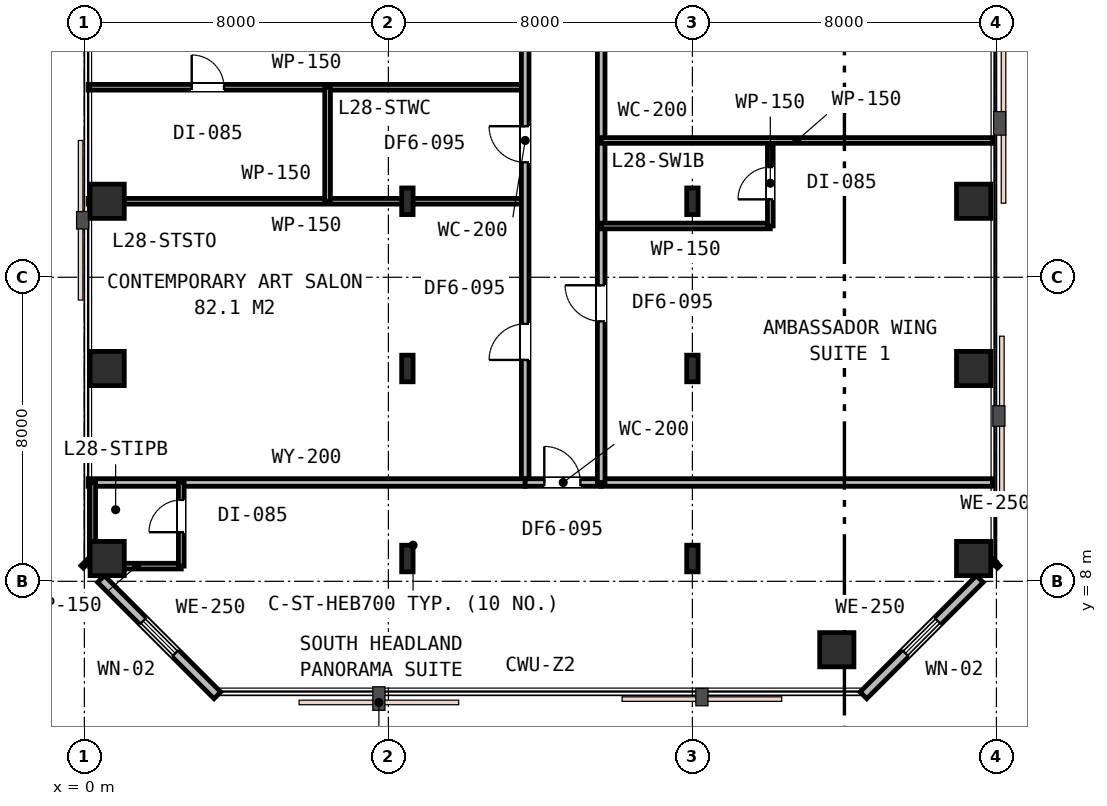
"""IFC4 building model, lengths in metres.
Left out: names, types, materials, properties, quantities, classifications, styles, units other than length and angle.
Written with IfcOpenShell. Run it as: python <this file> out.ifc"""

import sys

from ifc_helpers import new_model, si_unit, direction, frame, frame_2d, origin, origin_2d, place, context, subcontext, project, spatial, rectangle, i_section, extrude, element, fill, save


model = new_model("IFC4")
c1 = context("Model", 3, precision=1e-05, world=origin(), true_north=direction((0.0, 1.0)))
c2 = subcontext(c1, "Body", "Model", "MODEL_VIEW")
j1 = project(units=[si_unit("LENGTHUNIT", "METRE"), si_unit("PLANEANGLEUNIT", "RADIAN")], contexts=[c1])
p1 = place(None, origin())
s1 = spatial("IfcSite", under=j1, at=p1, CompositionType="ELEMENT")
p2 = place(p1, origin())
s2 = spatial("IfcBuilding", under=s1, at=p2, CompositionType="ELEMENT")
p3 = place(p2, frame((0.0, 0.0, 111.6)))
s3 = spatial("IfcBuildingStorey", under=s2, at=p3, CompositionType="ELEMENT", Elevation=111.6)
for number, where, z_axis, x_axis in (
    (1, (0.6, 8.6, 0.0), (0.0, 0.0, 1.0), (1.0, 0.0, 0.0)),
    (2, (0.6, 13.6, 0.0), (0.0, 0.0, 1.0), (1.0, 0.0, 0.0)),
    (3, (0.6, 18.0, 0.0), (0.0, 0.0, 1.0), (1.0, 0.0, 0.0)),
    (4, (19.8, 6.2, 0.0), (0.0, 0.0, 1.0), (1.0, 0.0, 0.0)),
    (5, (23.4, 8.6, 0.0), (0.0, 0.0, 1.0), (1.0, 0.0, 0.0)),
    (6, (23.4, 13.6, 0.0), (0.0, 0.0, 1.0), (1.0, 0.0, 0.0)),
    (7, (23.4, 18.0, 0.0), (0.0, 0.0, 1.0), (1.0, 0.0, 0.0)),
):
    element("IfcColumn", number, at=place(p3, frame(where, z_axis=z_axis, x_axis=x_axis)), inside=s3, PredefinedType="COLUMN", context=c2, shape_type="SweptSolid", body=[
        extrude(rectangle(XDim=0.9, YDim=0.9, at=origin_2d()), origin(), (0.0, 0.0, 1.0), 3.6),
    ])
for number, where, z_axis, x_axis in (
    (8, (8.5, 8.6, 0.0), (0.0, 0.0, 1.0), (1.0, 0.0, 0.0)),
    (9, (16.0, 8.6, 0.0), (0.0, 0.0, 1.0), (1.0, 0.0, 0.0)),
    (10, (8.5, 13.6, 0.0), (0.0, 0.0, 1.0), (1.0, 0.0, 0.0)),
    (11, (16.0, 13.6, 0.0), (0.0, 0.0, 1.0), (1.0, 0.0, 0.0)),
    (12, (8.5, 18.0, 0.0), (0.0, 0.0, 1.0), (1.0, 0.0, 0.0)),
    (13, (16.0, 18.0, 0.0), (0.0, 0.0, 1.0), (1.0, 0.0, 0.0)),
):
    element("IfcColumn", number, at=place(p3, frame(where, z_axis=z_axis, x_axis=x_axis)), inside=s3, PredefinedType="COLUMN", context=c2, shape_type="SweptSolid", body=[
        extrude(i_section(OverallWidth=0.3, OverallDepth=0.7, WebThickness=0.017, FlangeThickness=0.032, FilletRadius=0.027, at=origin_2d()), origin(), (0.0, 0.0, 1.0), 3.6),
    ])
p4 = place(p3, frame((20.5, 5.0, 0.0), z_axis=(0.0, 0.0, 1.0), x_axis=(0.707106781187, 0.707106781187, 0.0)))
e14 = element("IfcWall", 14, at=p4, inside=s3, PredefinedType="STANDARD", context=c2, shape_type="SweptSolid", body=[
    extrude(rectangle(XDim=4.33, YDim=0.25, at=frame_2d((2.165, 0.0))), origin(), (0.0, 0.0, 1.0), 3.33),
])
p5 = place(p4, frame((1.565, 0.0, 0.85)))
e15 = element("IfcOpeningElement", 15, at=p5, cuts=e14, PredefinedType="OPENING", context=c2, shape_type="SweptSolid", body=[
    extrude(rectangle(XDim=1.2, YDim=1.6, at=frame_2d((0.6, 0.8))), frame((0.0, 0.135, 0.0), z_axis=(0.0, -1.0, 0.0), x_axis=(1.0, 0.0, 0.0)), (0.0, 0.0, 1.0), 0.27),
])
for number, where, z_axis, x_axis in (
    (16, (23.938, 8.438, 0.0), (0.0, 0.0, 1.0), (0.707, 0.707, 0.0)),
    (17, (0.0, 8.5, 0.0), (0.0, 0.0, 1.0), (0.707, -0.707, 0.0)),
):
    element("IfcWall", number, at=place(p3, frame(where, z_axis=z_axis, x_axis=x_axis)), inside=s3, PredefinedType="STANDARD", context=c2, shape_type="SweptSolid", body=[
        extrude(rectangle(XDim=0.087, YDim=0.25, at=frame_2d((0.044, 0.0))), origin(), (0.0, 0.0, 1.0), 3.33),
    ])
p6 = place(p3, frame((0.438, 8.062, 0.0), z_axis=(0.0, 0.0, 1.0), x_axis=(0.707106781187, -0.707106781187, 0.0)))
e18 = element("IfcWall", 18, at=p6, inside=s3, PredefinedType="STANDARD", context=c2, shape_type="SweptSolid", body=[
    extrude(rectangle(XDim=4.33, YDim=0.25, at=frame_2d((2.165, 0.0))), origin(), (0.0, 0.0, 1.0), 3.33),
])
p7 = place(p6, frame((1.565, 0.0, 0.85)))
e19 = element("IfcOpeningElement", 19, at=p7, cuts=e18, PredefinedType="OPENING", context=c2, shape_type="SweptSolid", body=[
    extrude(rectangle(XDim=1.2, YDim=1.6, at=frame_2d((0.6, 0.8))), frame((0.0, 0.135, 0.0), z_axis=(0.0, -1.0, 0.0), x_axis=(1.0, 0.0, 0.0)), (0.0, 0.0, 1.0), 0.27),
])
p8 = place(p3, frame((0.1, 18.0, 0.0), z_axis=(0.0, 0.0, 1.0), x_axis=(1.0, 0.0, 0.0)))
e20 = element("IfcWall", 20, at=p8, inside=s3, PredefinedType="PARTITIONING", context=c2, shape_type="SweptSolid", body=[
    extrude(rectangle(XDim=11.5, YDim=0.15, at=frame_2d((5.75, 0.0))), origin(), (0.0, 0.0, 1.0), 2.87),
])
p9 = place(p3, frame((0.1, 21.0, 0.0), z_axis=(0.0, 0.0, 1.0), x_axis=(1.0, 0.0, 0.0)))
e21 = element("IfcWall", 21, at=p9, inside=s3, PredefinedType="PARTITIONING", context=c2, shape_type="SweptSolid", body=[
    extrude(rectangle(XDim=11.5, YDim=0.15, at=frame_2d((5.75, 0.0))), origin(), (0.0, 0.0, 1.0), 2.87),
])
p10 = place(p9, frame((2.725, 0.0, 0.0)))
e22 = element("IfcOpeningElement", 22, at=p10, cuts=e21, PredefinedType="OPENING", context=c2, shape_type="SweptSolid", body=[
    extrude(rectangle(XDim=0.85, YDim=2.15, at=frame_2d((0.425, 1.075))), frame((0.0, 0.085, 0.0), z_axis=(0.0, -1.0, 0.0), x_axis=(1.0, 0.0, 0.0)), (0.0, 0.0, 1.0), 0.17),
])
p11 = place(p3, frame((6.4, 18.0, 0.0), z_axis=(0.0, 0.0, 1.0), x_axis=(0.0, 1.0, 0.0)))
e23 = element("IfcWall", 23, at=p11, inside=s3, PredefinedType="PARTITIONING", context=c2, shape_type="SweptSolid", body=[
    extrude(rectangle(XDim=3.0, YDim=0.15, at=frame_2d((1.5, 0.0))), origin(), (0.0, 0.0, 1.0), 2.87),
])
p12 = place(p3, frame((11.6, 10.6, 0.0), z_axis=(0.0, 0.0, 1.0), x_axis=(0.0, 1.0, 0.0)))
e24 = element("IfcWall", 24, at=p12, inside=s3, PredefinedType="PARTITIONING", context=c2, shape_type="SweptSolid", body=[
    extrude(rectangle(XDim=18.0, YDim=0.2, at=frame_2d((9.0, 0.0))), origin(), (0.0, 0.0, 1.0), 2.87),
])
p13 = place(p12, frame((8.425, 0.0, 0.0)))
e25 = element("IfcOpeningElement", 25, at=p13, cuts=e24, PredefinedType="OPENING", context=c2, shape_type="SweptSolid", body=[
    extrude(rectangle(XDim=0.95, YDim=2.15, at=frame_2d((0.475, 1.075))), frame((0.0, 0.11, 0.0), z_axis=(0.0, -1.0, 0.0), x_axis=(1.0, 0.0, 0.0)), (0.0, 0.0, 1.0), 0.22),
])
p14 = place(p12, frame((13.725, 0.0, 0.0)))
e26 = element("IfcOpeningElement", 26, at=p14, cuts=e24, PredefinedType="OPENING", context=c2, shape_type="SweptSolid", body=[
    extrude(rectangle(XDim=0.95, YDim=2.15, at=frame_2d((0.475, 1.075))), frame((0.0, 0.11, 0.0), z_axis=(0.0, -1.0, 0.0), x_axis=(1.0, 0.0, 0.0)), (0.0, 0.0, 1.0), 0.22),
])
p15 = place(p12, frame((3.225, 0.0, 0.0)))
e27 = element("IfcOpeningElement", 27, at=p15, cuts=e24, PredefinedType="OPENING", context=c2, shape_type="SweptSolid", body=[
    extrude(rectangle(XDim=0.95, YDim=2.15, at=frame_2d((0.475, 1.075))), frame((0.0, 0.11, 0.0), z_axis=(0.0, -1.0, 0.0), x_axis=(1.0, 0.0, 0.0)), (0.0, 0.0, 1.0), 0.22),
])
p16 = place(p3, frame((0.1, 10.6, 0.0), z_axis=(0.0, 0.0, 1.0), x_axis=(1.0, 0.0, 0.0)))
e28 = element("IfcWall", 28, at=p16, inside=s3, PredefinedType="PARTITIONING", context=c2, shape_type="SweptSolid", body=[
    extrude(rectangle(XDim=11.5, YDim=0.2, at=frame_2d((5.75, 0.0))), origin(), (0.0, 0.0, 1.0), 2.87),
])
p17 = place(p3, frame((13.6, 10.6, 0.0), z_axis=(0.0, 0.0, 1.0), x_axis=(1.0, 0.0, 0.0)))
e29 = element("IfcWall", 29, at=p17, inside=s3, PredefinedType="PARTITIONING", context=c2, shape_type="SweptSolid", body=[
    extrude(rectangle(XDim=10.3, YDim=0.2, at=frame_2d((5.15, 0.0))), origin(), (0.0, 0.0, 1.0), 2.87),
])
p18 = place(p3, frame((11.6, 10.6, 0.0), z_axis=(0.0, 0.0, 1.0), x_axis=(1.0, 0.0, 0.0)))
e30 = element("IfcWall", 30, at=p18, inside=s3, PredefinedType="PARTITIONING", context=c2, shape_type="SweptSolid", body=[
    extrude(rectangle(XDim=2.0, YDim=0.2, at=frame_2d((1.0, 0.0))), origin(), (0.0, 0.0, 1.0), 3.01),
])
p19 = place(p18, frame((0.502, 0.0, 0.0)))
e31 = element("IfcOpeningElement", 31, at=p19, cuts=e30, PredefinedType="OPENING", context=c2, shape_type="SweptSolid", body=[
    extrude(rectangle(XDim=0.95, YDim=2.15, at=frame_2d((0.475, 1.075))), frame((0.0, 0.11, 0.0), z_axis=(0.0, -1.0, 0.0), x_axis=(1.0, 0.0, 0.0)), (0.0, 0.0, 1.0), 0.22),
])
p20 = place(p3, frame((0.2, 8.4, 0.0), z_axis=(0.0, 0.0, 1.0), x_axis=(1.0, 0.0, 0.0)))
e32 = element("IfcWall", 32, at=p20, inside=s3, PredefinedType="PARTITIONING", context=c2, shape_type="SweptSolid", body=[
    extrude(rectangle(XDim=2.35, YDim=0.15, at=frame_2d((1.175, 0.0))), origin(), (0.0, 0.0, 1.0), 2.87),
])
p21 = place(p3, frame((2.55, 8.4, 0.0), z_axis=(0.0, 0.0, 1.0), x_axis=(0.0, 1.0, 0.0)))
e33 = element("IfcWall", 33, at=p21, inside=s3, PredefinedType="PARTITIONING", context=c2, shape_type="SweptSolid", body=[
    extrude(rectangle(XDim=2.2, YDim=0.15, at=frame_2d((1.1, 0.0))), origin(), (0.0, 0.0, 1.0), 2.87),
])
p22 = place(p21, frame((0.892, 0.0, 0.0)))
e34 = element("IfcOpeningElement", 34, at=p22, cuts=e33, PredefinedType="OPENING", context=c2, shape_type="SweptSolid", body=[
    extrude(rectangle(XDim=0.85, YDim=2.15, at=frame_2d((0.425, 1.075))), frame((0.0, 0.085, 0.0), z_axis=(0.0, -1.0, 0.0), x_axis=(1.0, 0.0, 0.0)), (0.0, 0.0, 1.0), 0.17),
])
p23 = place(p3, frame((0.22, 8.38, 0.0), z_axis=(0.0, 0.0, 1.0), x_axis=(0.0, 1.0, 0.0)))
e35 = element("IfcWall", 35, at=p23, inside=s3, PredefinedType="PARTITIONING", context=c2, shape_type="SweptSolid", body=[
    extrude(rectangle(XDim=2.22, YDim=0.15, at=frame_2d((1.11, 0.0))), origin(), (0.0, 0.0, 1.0), 2.87),
])
p24 = place(p3, frame((13.6, 10.6, 0.0), z_axis=(0.0, 0.0, 1.0), x_axis=(0.0, 1.0, 0.0)))
e36 = element("IfcWall", 36, at=p24, inside=s3, PredefinedType="PARTITIONING", context=c2, shape_type="SweptSolid", body=[
    extrude(rectangle(XDim=18.0, YDim=0.2, at=frame_2d((9.0, 0.0))), origin(), (0.0, 0.0, 1.0), 2.87),
])
p25 = place(p24, frame((4.24, 0.0, 0.0)))
e37 = element("IfcOpeningElement", 37, at=p25, cuts=e36, PredefinedType="OPENING", context=c2, shape_type="SweptSolid", body=[
    extrude(rectangle(XDim=0.95, YDim=2.15, at=frame_2d((0.475, 1.075))), frame((0.0, 0.11, 0.0), z_axis=(0.0, -1.0, 0.0), x_axis=(1.0, 0.0, 0.0)), (0.0, 0.0, 1.0), 0.22),
])
p26 = place(p24, frame((11.494, 0.0, 0.0)))
e38 = element("IfcOpeningElement", 38, at=p26, cuts=e36, PredefinedType="OPENING", context=c2, shape_type="SweptSolid", body=[
    extrude(rectangle(XDim=0.95, YDim=2.15, at=frame_2d((0.475, 1.075))), frame((0.0, 0.11, 0.0), z_axis=(0.0, -1.0, 0.0), x_axis=(1.0, 0.0, 0.0)), (0.0, 0.0, 1.0), 0.22),
])
p27 = place(p3, frame((13.6, 17.35, 0.0), z_axis=(0.0, 0.0, 1.0), x_axis=(1.0, 0.0, 0.0)))
e39 = element("IfcWall", 39, at=p27, inside=s3, PredefinedType="PARTITIONING", context=c2, shape_type="SweptSolid", body=[
    extrude(rectangle(XDim=4.45, YDim=0.15, at=frame_2d((2.225, 0.0))), origin(), (0.0, 0.0, 1.0), 2.87),
])
p28 = place(p3, frame((18.05, 17.35, 0.0), z_axis=(0.0, 0.0, 1.0), x_axis=(0.0, 1.0, 0.0)))
e40 = element("IfcWall", 40, at=p28, inside=s3, PredefinedType="PARTITIONING", context=c2, shape_type="SweptSolid", body=[
    extrude(rectangle(XDim=2.25, YDim=0.15, at=frame_2d((1.125, 0.0))), origin(), (0.0, 0.0, 1.0), 2.87),
])
p29 = place(p28, frame((0.7, 0.0, 0.0)))
e41 = element("IfcOpeningElement", 41, at=p29, cuts=e40, PredefinedType="OPENING", context=c2, shape_type="SweptSolid", body=[
    extrude(rectangle(XDim=0.85, YDim=2.15, at=frame_2d((0.425, 1.075))), frame((0.0, 0.085, 0.0), z_axis=(0.0, -1.0, 0.0), x_axis=(1.0, 0.0, 0.0)), (0.0, 0.0, 1.0), 0.17),
])
p30 = place(p3, frame((13.6, 19.6, 0.0), z_axis=(0.0, 0.0, 1.0), x_axis=(1.0, 0.0, 0.0)))
e42 = element("IfcWall", 42, at=p30, inside=s3, PredefinedType="PARTITIONING", context=c2, shape_type="SweptSolid", body=[
    extrude(rectangle(XDim=10.3, YDim=0.15, at=frame_2d((5.15, 0.0))), origin(), (0.0, 0.0, 1.0), 2.87),
])
p31 = place(p5, origin())
e43 = element("IfcWindow", 43, at=p31, inside=s3, PartitioningType="SINGLE_PANEL", PredefinedType="WINDOW", context=c2, shape_type="SweptSolid", body=[
    extrude(rectangle(XDim=1.2, YDim=1.6, at=frame_2d((0.6, 0.8))), frame((0.0, 0.03, 0.0), z_axis=(0.0, -1.0, 0.0), x_axis=(1.0, 0.0, 0.0)), (0.0, 0.0, 1.0), 0.06),
])
fill(e15, e43)
p32 = place(p7, origin())
e44 = element("IfcWindow", 44, at=p32, inside=s3, PartitioningType="SINGLE_PANEL", PredefinedType="WINDOW", context=c2, shape_type="SweptSolid", body=[
    extrude(rectangle(XDim=1.2, YDim=1.6, at=frame_2d((0.6, 0.8))), frame((0.0, 0.03, 0.0), z_axis=(0.0, -1.0, 0.0), x_axis=(1.0, 0.0, 0.0)), (0.0, 0.0, 1.0), 0.06),
])
fill(e19, e44)
p33 = place(p13, origin())
e45 = element("IfcDoor", 45, at=p33, inside=s3, OperationType="SINGLE_SWING_RIGHT", PredefinedType="DOOR", context=c2, shape_type="SweptSolid", body=[
    extrude(rectangle(XDim=0.95, YDim=2.15, at=frame_2d((0.475, 1.075))), frame((0.0, 0.025, 0.0), z_axis=(0.0, -1.0, 0.0), x_axis=(1.0, 0.0, 0.0)), (0.0, 0.0, 1.0), 0.05),
])
fill(e25, e45)
p34 = place(p10, origin())
e46 = element("IfcDoor", 46, at=p34, inside=s3, OperationType="SINGLE_SWING_LEFT", PredefinedType="DOOR", context=c2, shape_type="SweptSolid", body=[
    extrude(rectangle(XDim=0.85, YDim=2.15, at=frame_2d((0.425, 1.075))), frame((0.0, 0.025, 0.0), z_axis=(0.0, -1.0, 0.0), x_axis=(1.0, 0.0, 0.0)), (0.0, 0.0, 1.0), 0.05),
])
fill(e22, e46)
p35 = place(p15, origin())
e47 = element("IfcDoor", 47, at=p35, inside=s3, OperationType="SINGLE_SWING_LEFT", PredefinedType="DOOR", context=c2, shape_type="SweptSolid", body=[
    extrude(rectangle(XDim=0.95, YDim=2.15, at=frame_2d((0.475, 1.075))), frame((0.0, 0.025, 0.0), z_axis=(0.0, -1.0, 0.0), x_axis=(1.0, 0.0, 0.0)), (0.0, 0.0, 1.0), 0.05),
])
fill(e27, e47)
p36 = place(p19, origin())
e48 = element("IfcDoor", 48, at=p36, inside=s3, OperationType="SINGLE_SWING_LEFT", PredefinedType="DOOR", context=c2, shape_type="SweptSolid", body=[
    extrude(rectangle(XDim=0.95, YDim=2.15, at=frame_2d((0.475, 1.075))), frame((0.0, 0.025, 0.0), z_axis=(0.0, -1.0, 0.0), x_axis=(1.0, 0.0, 0.0)), (0.0, 0.0, 1.0), 0.05),
])
fill(e31, e48)
p37 = place(p22, origin())
e49 = element("IfcDoor", 49, at=p37, inside=s3, OperationType="SINGLE_SWING_LEFT", PredefinedType="DOOR", context=c2, shape_type="SweptSolid", body=[
    extrude(rectangle(XDim=0.85, YDim=2.15, at=frame_2d((0.425, 1.075))), frame((0.0, 0.025, 0.0), z_axis=(0.0, -1.0, 0.0), x_axis=(1.0, 0.0, 0.0)), (0.0, 0.0, 1.0), 0.05),
])
fill(e34, e49)
p38 = place(p25, origin())
e50 = element("IfcDoor", 50, at=p38, inside=s3, OperationType="SINGLE_SWING_RIGHT", PredefinedType="DOOR", context=c2, shape_type="SweptSolid", body=[
    extrude(rectangle(XDim=0.95, YDim=2.15, at=frame_2d((0.475, 1.075))), frame((0.0, 0.025, 0.0), z_axis=(0.0, -1.0, 0.0), x_axis=(1.0, 0.0, 0.0)), (0.0, 0.0, 1.0), 0.05),
])
fill(e37, e50)
p39 = place(p29, origin())
e51 = element("IfcDoor", 51, at=p39, inside=s3, OperationType="SINGLE_SWING_LEFT", PredefinedType="DOOR", context=c2, shape_type="SweptSolid", body=[
    extrude(rectangle(XDim=0.85, YDim=2.15, at=frame_2d((0.425, 1.075))), frame((0.0, 0.025, 0.0), z_axis=(0.0, -1.0, 0.0), x_axis=(1.0, 0.0, 0.0)), (0.0, 0.0, 1.0), 0.05),
])
fill(e41, e51)
save(model, sys.argv[1])
